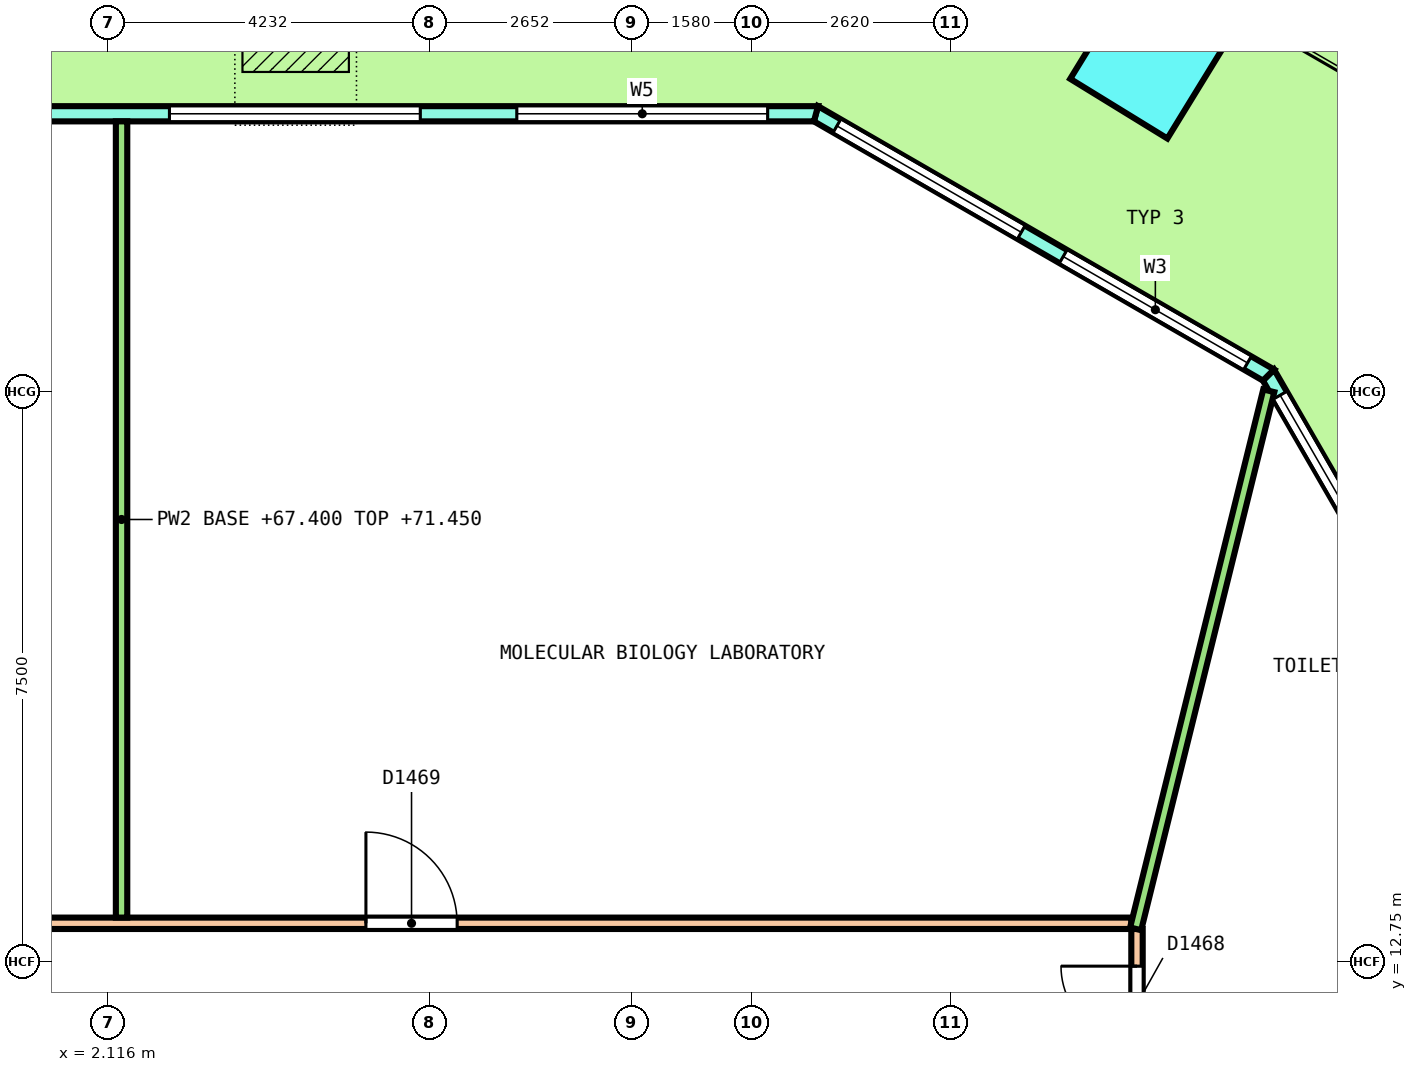
"""IFC4 building model, lengths in metres.
Left out: names, types, materials, properties, quantities, classifications, styles, units other than length and angle.
Written with IfcOpenShell. Run it as: python <this file> out.ifc"""

import sys

from ifc_helpers import new_model, si_unit, direction, frame, frame_2d, origin, origin_2d, place, context, subcontext, project, spatial, polyline, rectangle, outline, extrude, element, fill, save


model = new_model("IFC4")
c1 = context("Model", 3, precision=1e-05, world=origin(), true_north=direction((0.0, 1.0)))
c2 = subcontext(c1, "Body", "Model", "MODEL_VIEW")
j1 = project(units=[si_unit("LENGTHUNIT", "METRE"), si_unit("PLANEANGLEUNIT", "RADIAN")], contexts=[c1])
p1 = place(None, origin())
s1 = spatial("IfcSite", under=j1, at=p1, CompositionType="ELEMENT")
p2 = place(p1, origin())
s2 = spatial("IfcBuilding", under=s1, at=p2, CompositionType="ELEMENT")
p3 = place(p2, frame((0.0, 0.0, 67.4)))
s3 = spatial("IfcBuildingStorey", under=s2, at=p3, CompositionType="ELEMENT", Elevation=67.4)
for number, where, z_axis, x_axis in (
    (1, (19.43, 22.512, 0.0), (-0.341, 0.0, 0.94), (-0.801, 0.523, -0.291)),
    (2, (15.803, 24.606, 0.0), (-0.341, 0.0, 0.94), (-0.801, 0.523, -0.291)),
):
    element("IfcColumn", number, at=place(p3, frame(where, z_axis=z_axis, x_axis=x_axis)), inside=s3, PredefinedType="COLUMN", context=c2, shape_type="SweptSolid", body=[
        extrude(rectangle(XDim=1.5, YDim=1.5, at=origin_2d()), origin(), (0.0, 0.0, 1.0), 4.298),
    ])
p4 = place(p3, frame((26.411, 4.82, 0.0), z_axis=(0.0, 0.0, 1.0), x_axis=(-0.500000137386, 0.866025324465, 0.0)))
e3 = element("IfcWall", 3, at=p4, inside=s3, PredefinedType="SOLIDWALL", context=c2, shape_type="SweptSolid", body=[
    extrude(outline(polyline([(-0.027, -0.1), (0.979, -0.1), (1.986, -0.1), (2.992, -0.1), (3.999, -0.1), (5.005, -0.1), (6.012, -0.1), (7.018, -0.1), (8.025, -0.1), (9.031, -0.1), (10.038, -0.1), (11.044, -0.1), (12.051, -0.1), (13.057, -0.1), (14.063, -0.1), (15.07, -0.1), (16.076, -0.1), (17.083, -0.1), (18.089, -0.1), (18.036, 0.1), (17.035, 0.1), (16.035, 0.1), (15.034, 0.1), (14.034, 0.1), (13.033, 0.1), (12.033, 0.1), (11.032, 0.1), (10.032, 0.1), (9.031, 0.1), (8.031, 0.1), (7.03, 0.1), (6.03, 0.1), (5.029, 0.1), (4.029, 0.1), (3.028, 0.1), (2.028, 0.1), (1.027, 0.1), (0.027, 0.1), (-0.027, -0.1)])), origin(), (0.0, 0.0, 1.0), 4.1),
])
p5 = place(p4, frame((0.306, 0.0, 0.1)))
e4 = element("IfcOpeningElement", 4, at=p5, cuts=e3, PredefinedType="OPENING", context=c2, shape_type="SweptSolid", body=[
    extrude(rectangle(XDim=3.0, YDim=2.9, at=frame_2d((1.5, 1.45))), frame((0.0, 0.11, 0.0), z_axis=(0.0, -1.0, 0.0), x_axis=(1.0, 0.0, 0.0)), (0.0, 0.0, 1.0), 0.22),
])
p6 = place(p4, frame((3.919, 0.0, 0.1)))
e5 = element("IfcOpeningElement", 5, at=p6, cuts=e3, PredefinedType="OPENING", context=c2, shape_type="SweptSolid", body=[
    extrude(rectangle(XDim=3.0, YDim=2.9, at=frame_2d((1.5, 1.45))), frame((0.0, 0.11, 0.0), z_axis=(0.0, -1.0, 0.0), x_axis=(1.0, 0.0, 0.0)), (0.0, 0.0, 1.0), 0.22),
])
p7 = place(p4, frame((8.131, 0.0, 0.0)))
e6 = element("IfcOpeningElement", 6, at=p7, cuts=e3, PredefinedType="OPENING", context=c2, shape_type="SweptSolid", body=[
    extrude(rectangle(XDim=1.8, YDim=2.4, at=frame_2d((0.9, 1.2))), frame((0.0, 0.11, 0.0), z_axis=(0.0, -1.0, 0.0), x_axis=(1.0, 0.0, 0.0)), (0.0, 0.0, 1.0), 0.22),
])
p8 = place(p4, frame((8.131, 0.0, 2.55)))
e7 = element("IfcOpeningElement", 7, at=p8, cuts=e3, PredefinedType="OPENING", context=c2, shape_type="SweptSolid", body=[
    extrude(rectangle(XDim=1.8, YDim=0.45, at=frame_2d((0.9, 0.225))), frame((0.0, 0.11, 0.0), z_axis=(0.0, -1.0, 0.0), x_axis=(1.0, 0.0, 0.0)), (0.0, 0.0, 1.0), 0.22),
])
p9 = place(p4, frame((11.144, 0.0, 0.1)))
e8 = element("IfcOpeningElement", 8, at=p9, cuts=e3, PredefinedType="OPENING", context=c2, shape_type="SweptSolid", body=[
    extrude(rectangle(XDim=3.0, YDim=2.9, at=frame_2d((1.5, 1.45))), frame((0.0, 0.11, 0.0), z_axis=(0.0, -1.0, 0.0), x_axis=(1.0, 0.0, 0.0)), (0.0, 0.0, 1.0), 0.22),
])
p10 = place(p4, frame((14.756, 0.0, 0.1)))
e9 = element("IfcOpeningElement", 9, at=p10, cuts=e3, PredefinedType="OPENING", context=c2, shape_type="SweptSolid", body=[
    extrude(rectangle(XDim=3.0, YDim=2.9, at=frame_2d((1.5, 1.45))), frame((0.0, 0.11, 0.0), z_axis=(0.0, -1.0, 0.0), x_axis=(1.0, 0.0, 0.0)), (0.0, 0.0, 1.0), 0.22),
])
p11 = place(p3, frame((17.38, 20.463, 0.0), z_axis=(0.0, 0.0, 1.0), x_axis=(-0.866029458321, 0.49999297727, 0.0)))
e10 = element("IfcWall", 10, at=p11, inside=s3, PredefinedType="SOLIDWALL", context=c2, shape_type="SweptSolid", body=[
    extrude(outline(polyline([(-0.027, -0.1), (1.128, -0.1), (2.282, -0.1), (3.437, -0.1), (4.592, -0.1), (5.747, -0.1), (6.901, -0.1), (6.848, 0.1), (5.711, 0.1), (4.574, 0.1), (3.437, 0.1), (2.301, 0.1), (1.164, 0.1), (0.027, 0.1), (-0.027, -0.1)])), origin(), (0.0, 0.0, 1.0), 4.1),
])
p12 = place(p11, frame((0.319, 0.0, 0.1)))
e11 = element("IfcOpeningElement", 11, at=p12, cuts=e10, PredefinedType="OPENING", context=c2, shape_type="SweptSolid", body=[
    extrude(rectangle(XDim=2.8, YDim=2.9, at=frame_2d((1.4, 1.45))), frame((0.0, 0.11, 0.0), z_axis=(0.0, -1.0, 0.0), x_axis=(1.0, 0.0, 0.0)), (0.0, 0.0, 1.0), 0.22),
])
p13 = place(p11, frame((3.756, 0.0, 0.1)))
e12 = element("IfcOpeningElement", 12, at=p13, cuts=e10, PredefinedType="OPENING", context=c2, shape_type="SweptSolid", body=[
    extrude(rectangle(XDim=2.8, YDim=2.9, at=frame_2d((1.4, 1.45))), frame((0.0, 0.11, 0.0), z_axis=(0.0, -1.0, 0.0), x_axis=(1.0, 0.0, 0.0)), (0.0, 0.0, 1.0), 0.22),
])
p14 = place(p3, frame((11.426, 23.9, 0.0), z_axis=(0.0, 0.0, 1.0), x_axis=(-1.0, 0.0, 0.0)))
e13 = element("IfcWall", 13, at=p14, inside=s3, PredefinedType="SOLIDWALL", context=c2, shape_type="SweptSolid", body=[
    extrude(outline(polyline([(-0.027, -0.1), (1.014, -0.1), (2.055, -0.1), (3.097, -0.1), (4.138, -0.1), (5.179, -0.1), (6.22, -0.1), (7.261, -0.1), (8.303, -0.1), (9.344, -0.1), (10.385, -0.1), (11.426, -0.1), (12.468, -0.1), (13.509, -0.1), (14.55, -0.1), (15.591, -0.1), (16.632, -0.1), (17.673, -0.1), (18.715, -0.1), (19.756, -0.1), (20.797, -0.1), (21.838, -0.1), (22.879, -0.1), (22.826, 0.1), (21.789, 0.1), (20.753, 0.1), (19.717, 0.1), (18.68, 0.1), (17.644, 0.1), (16.608, 0.1), (15.572, 0.1), (14.535, 0.1), (13.499, 0.1), (12.463, 0.1), (11.426, 0.1), (10.39, 0.1), (9.354, 0.1), (8.317, 0.1), (7.281, 0.1), (6.245, 0.1), (5.208, 0.1), (4.172, 0.1), (3.136, 0.1), (2.099, 0.1), (1.063, 0.1), (0.027, 0.1), (-0.027, -0.1)])), origin(), (0.0, 0.0, 1.0), 4.1),
])
p15 = place(p14, frame((0.635, 0.0, 0.1)))
e14 = element("IfcOpeningElement", 14, at=p15, cuts=e13, PredefinedType="OPENING", context=c2, shape_type="SweptSolid", body=[
    extrude(rectangle(XDim=3.3, YDim=2.9, at=frame_2d((1.65, 1.45))), frame((0.0, 0.11, 0.0), z_axis=(0.0, -1.0, 0.0), x_axis=(1.0, 0.0, 0.0)), (0.0, 0.0, 1.0), 0.22),
])
p16 = place(p14, frame((5.206, 0.0, 0.1)))
e15 = element("IfcOpeningElement", 15, at=p16, cuts=e13, PredefinedType="OPENING", context=c2, shape_type="SweptSolid", body=[
    extrude(rectangle(XDim=3.3, YDim=2.9, at=frame_2d((1.65, 1.45))), frame((0.0, 0.11, 0.0), z_axis=(0.0, -1.0, 0.0), x_axis=(1.0, 0.0, 0.0)), (0.0, 0.0, 1.0), 0.22),
])
p17 = place(p14, frame((10.526, 0.0, 0.0)))
e16 = element("IfcOpeningElement", 16, at=p17, cuts=e13, PredefinedType="OPENING", context=c2, shape_type="SweptSolid", body=[
    extrude(rectangle(XDim=1.8, YDim=2.4, at=frame_2d((0.9, 1.2))), frame((0.0, 0.11, 0.0), z_axis=(0.0, -1.0, 0.0), x_axis=(1.0, 0.0, 0.0)), (0.0, 0.0, 1.0), 0.22),
])
p18 = place(p14, frame((10.526, 0.0, 2.55)))
e17 = element("IfcOpeningElement", 17, at=p18, cuts=e13, PredefinedType="OPENING", context=c2, shape_type="SweptSolid", body=[
    extrude(rectangle(XDim=1.8, YDim=0.45, at=frame_2d((0.9, 0.225))), frame((0.0, 0.11, 0.0), z_axis=(0.0, -1.0, 0.0), x_axis=(1.0, 0.0, 0.0)), (0.0, 0.0, 1.0), 0.22),
])
p19 = place(p14, frame((14.347, 0.0, 0.1)))
e18 = element("IfcOpeningElement", 18, at=p19, cuts=e13, PredefinedType="OPENING", context=c2, shape_type="SweptSolid", body=[
    extrude(rectangle(XDim=3.3, YDim=2.9, at=frame_2d((1.65, 1.45))), frame((0.0, 0.11, 0.0), z_axis=(0.0, -1.0, 0.0), x_axis=(1.0, 0.0, 0.0)), (0.0, 0.0, 1.0), 0.22),
])
p20 = place(p14, frame((18.917, 0.0, 0.1)))
e19 = element("IfcOpeningElement", 19, at=p20, cuts=e13, PredefinedType="OPENING", context=c2, shape_type="SweptSolid", body=[
    extrude(rectangle(XDim=3.3, YDim=2.9, at=frame_2d((1.65, 1.45))), frame((0.0, 0.11, 0.0), z_axis=(0.0, -1.0, 0.0), x_axis=(1.0, 0.0, 0.0)), (0.0, 0.0, 1.0), 0.22),
])
p21 = place(p3, frame((15.65, -13.175, 0.0), z_axis=(0.0, 0.0, 1.0), x_axis=(0.0, 1.0, 0.0)))
e20 = element("IfcWall", 20, at=p21, inside=s3, PredefinedType="PARTITIONING", context=c2, shape_type="SweptSolid", body=[
    extrude(rectangle(XDim=26.35, YDim=0.15, at=frame_2d((13.175, 0.0))), origin(), (0.0, 0.0, 1.0), 3.05),
])
p22 = place(p21, frame((19.516, 0.0, 0.0)))
e21 = element("IfcOpeningElement", 21, at=p22, cuts=e20, PredefinedType="OPENING", context=c2, shape_type="SweptSolid", body=[
    extrude(rectangle(XDim=1.0, YDim=2.1, at=frame_2d((0.5, 1.05))), frame((0.0, 0.085, 0.0), z_axis=(0.0, -1.0, 0.0), x_axis=(1.0, 0.0, 0.0)), (0.0, 0.0, 1.0), 0.17),
])
p23 = place(p21, frame((24.861, 0.0, 0.0)))
e22 = element("IfcOpeningElement", 22, at=p23, cuts=e20, PredefinedType="OPENING", context=c2, shape_type="SweptSolid", body=[
    extrude(rectangle(XDim=1.0, YDim=2.1, at=frame_2d((0.5, 1.05))), frame((0.0, 0.085, 0.0), z_axis=(0.0, -1.0, 0.0), x_axis=(1.0, 0.0, 0.0)), (0.0, 0.0, 1.0), 0.17),
])
p24 = place(p21, frame((3.851, 0.0, 0.0)))
e23 = element("IfcOpeningElement", 23, at=p24, cuts=e20, PredefinedType="OPENING", context=c2, shape_type="SweptSolid", body=[
    extrude(rectangle(XDim=1.0, YDim=2.1, at=frame_2d((0.5, 1.05))), frame((0.0, 0.085, 0.0), z_axis=(0.0, -1.0, 0.0), x_axis=(1.0, 0.0, 0.0)), (0.0, 0.0, 1.0), 0.17),
])
p25 = place(p21, frame((11.974, 0.0, 0.0)))
e24 = element("IfcOpeningElement", 24, at=p25, cuts=e20, PredefinedType="OPENING", context=c2, shape_type="SweptSolid", body=[
    extrude(rectangle(XDim=1.2, YDim=2.1, at=frame_2d((0.6, 1.05))), frame((0.0, 0.085, 0.0), z_axis=(0.0, -1.0, 0.0), x_axis=(1.0, 0.0, 0.0)), (0.0, 0.0, 1.0), 0.17),
])
p26 = place(p3, frame((-15.575, 13.25, 0.0), z_axis=(0.0, 0.0, 1.0), x_axis=(1.0, 0.0, 0.0)))
e25 = element("IfcWall", 25, at=p26, inside=s3, PredefinedType="PARTITIONING", context=c2, shape_type="SweptSolid", body=[
    extrude(rectangle(XDim=31.15, YDim=0.15, at=frame_2d((15.575, 0.0))), origin(), (0.0, 0.0, 1.0), 3.05),
])
p27 = place(p26, frame((21.081, 0.0, 0.0)))
e26 = element("IfcOpeningElement", 26, at=p27, cuts=e25, PredefinedType="OPENING", context=c2, shape_type="SweptSolid", body=[
    extrude(rectangle(XDim=1.2, YDim=2.1, at=frame_2d((0.6, 1.05))), frame((0.0, 0.085, 0.0), z_axis=(0.0, -1.0, 0.0), x_axis=(1.0, 0.0, 0.0)), (0.0, 0.0, 1.0), 0.17),
])
p28 = place(p26, frame((14.5, 0.0, 0.0)))
e27 = element("IfcOpeningElement", 27, at=p28, cuts=e25, PredefinedType="OPENING", context=c2, shape_type="SweptSolid", body=[
    extrude(rectangle(XDim=1.2, YDim=2.1, at=frame_2d((0.6, 1.05))), frame((0.0, 0.085, 0.0), z_axis=(0.0, -1.0, 0.0), x_axis=(1.0, 0.0, 0.0)), (0.0, 0.0, 1.0), 0.17),
])
p29 = place(p26, frame((5.733, 0.0, 0.0)))
e28 = element("IfcOpeningElement", 28, at=p29, cuts=e25, PredefinedType="OPENING", context=c2, shape_type="SweptSolid", body=[
    extrude(rectangle(XDim=1.2, YDim=2.1, at=frame_2d((0.6, 1.05))), frame((0.0, 0.085, 0.0), z_axis=(0.0, -1.0, 0.0), x_axis=(1.0, 0.0, 0.0)), (0.0, 0.0, 1.0), 0.17),
])
p30 = place(p3, frame((15.632, 13.177, 0.0), z_axis=(0.0, 0.0, 1.0), x_axis=(0.240218906568, 0.970718742442, 0.0)))
e29 = element("IfcWall", 29, at=p30, inside=s3, PredefinedType="PARTITIONING", context=c2, shape_type="SweptSolid", body=[
    extrude(rectangle(XDim=7.292, YDim=0.15, at=frame_2d((3.646, 0.0))), origin(), (0.0, 0.0, 1.0), 3.05),
])
p31 = place(p3, frame((2.291, 13.325, 0.0), z_axis=(0.0, 0.0, 1.0), x_axis=(0.0, 1.0, 0.0)))
e30 = element("IfcWall", 30, at=p31, inside=s3, PredefinedType="PARTITIONING", context=c2, shape_type="SweptSolid", body=[
    extrude(rectangle(XDim=10.475, YDim=0.15, at=frame_2d((5.238, 0.0))), origin(), (0.0, 0.0, 1.0), 4.05),
])
p32 = place(p10, origin())
e31 = element("IfcWindow", 31, at=p32, inside=s3, PartitioningType="SINGLE_PANEL", PredefinedType="WINDOW", context=c2, shape_type="SweptSolid", body=[
    extrude(rectangle(XDim=3.0, YDim=2.9, at=frame_2d((1.5, 1.45))), frame((0.0, 0.03, 0.0), z_axis=(0.0, -1.0, 0.0), x_axis=(1.0, 0.0, 0.0)), (0.0, 0.0, 1.0), 0.06),
])
fill(e9, e31)
p33 = place(p12, origin())
e32 = element("IfcWindow", 32, at=p33, inside=s3, PartitioningType="SINGLE_PANEL", PredefinedType="WINDOW", context=c2, shape_type="SweptSolid", body=[
    extrude(rectangle(XDim=2.8, YDim=2.9, at=frame_2d((1.4, 1.45))), frame((0.0, 0.03, 0.0), z_axis=(0.0, -1.0, 0.0), x_axis=(1.0, 0.0, 0.0)), (0.0, 0.0, 1.0), 0.06),
])
fill(e11, e32)
p34 = place(p13, origin())
e33 = element("IfcWindow", 33, at=p34, inside=s3, PartitioningType="SINGLE_PANEL", PredefinedType="WINDOW", context=c2, shape_type="SweptSolid", body=[
    extrude(rectangle(XDim=2.8, YDim=2.9, at=frame_2d((1.4, 1.45))), frame((0.0, 0.03, 0.0), z_axis=(0.0, -1.0, 0.0), x_axis=(1.0, 0.0, 0.0)), (0.0, 0.0, 1.0), 0.06),
])
fill(e12, e33)
p35 = place(p15, origin())
e34 = element("IfcWindow", 34, at=p35, inside=s3, PartitioningType="SINGLE_PANEL", PredefinedType="WINDOW", context=c2, shape_type="SweptSolid", body=[
    extrude(rectangle(XDim=3.3, YDim=2.9, at=frame_2d((1.65, 1.45))), frame((0.0, 0.03, 0.0), z_axis=(0.0, -1.0, 0.0), x_axis=(1.0, 0.0, 0.0)), (0.0, 0.0, 1.0), 0.06),
])
fill(e14, e34)
p36 = place(p16, origin())
e35 = element("IfcWindow", 35, at=p36, inside=s3, PartitioningType="SINGLE_PANEL", PredefinedType="WINDOW", context=c2, shape_type="SweptSolid", body=[
    extrude(rectangle(XDim=3.3, YDim=2.9, at=frame_2d((1.65, 1.45))), frame((0.0, 0.03, 0.0), z_axis=(0.0, -1.0, 0.0), x_axis=(1.0, 0.0, 0.0)), (0.0, 0.0, 1.0), 0.06),
])
fill(e15, e35)
p37 = place(p23, origin())
e36 = element("IfcDoor", 36, at=p37, inside=s3, OperationType="SINGLE_SWING_LEFT", PredefinedType="DOOR", context=c2, shape_type="SweptSolid", body=[
    extrude(rectangle(XDim=1.0, YDim=2.1, at=frame_2d((0.5, 1.05))), frame((0.0, 0.025, 0.0), z_axis=(0.0, -1.0, 0.0), x_axis=(1.0, 0.0, 0.0)), (0.0, 0.0, 1.0), 0.05),
])
fill(e22, e36)
p38 = place(p27, origin())
e37 = element("IfcDoor", 37, at=p38, inside=s3, OperationType="DOUBLE_DOOR_SINGLE_SWING", PredefinedType="DOOR", context=c2, shape_type="SweptSolid", body=[
    extrude(rectangle(XDim=1.2, YDim=2.1, at=frame_2d((0.6, 1.05))), frame((0.0, 0.025, 0.0), z_axis=(0.0, -1.0, 0.0), x_axis=(1.0, 0.0, 0.0)), (0.0, 0.0, 1.0), 0.05),
])
fill(e26, e37)
save(model, sys.argv[1])
